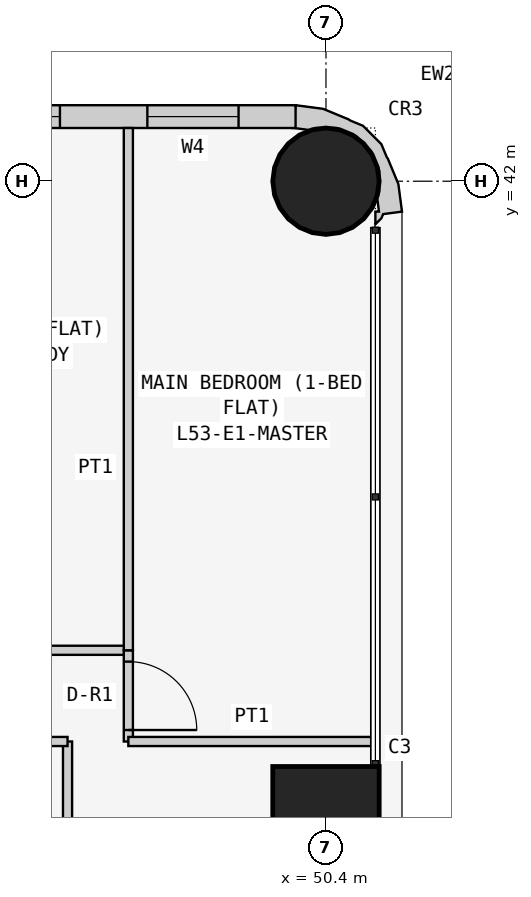
"""IFC4 building model, lengths in metres.
Left out: names, types, materials, properties, quantities, classifications, styles, units other than length and angle.
Written with IfcOpenShell. Run it as: python <this file> out.ifc"""

import sys

from ifc_helpers import new_model, si_unit, direction, frame, frame_2d, origin, origin_2d, place, context, subcontext, project, spatial, polyline, rectangle, circle, outline, extrude, element, fill, save


model = new_model("IFC4")
c1 = context("Model", 3, precision=1e-05, world=origin(), true_north=direction((0.0, 1.0)))
c2 = subcontext(c1, "Body", "Model", "MODEL_VIEW")
j1 = project(units=[si_unit("LENGTHUNIT", "METRE"), si_unit("PLANEANGLEUNIT", "RADIAN")], contexts=[c1])
p1 = place(None, origin())
s1 = spatial("IfcSite", under=j1, at=p1, CompositionType="ELEMENT")
p2 = place(p1, origin())
s2 = spatial("IfcBuilding", under=s1, at=p2, CompositionType="ELEMENT")
p3 = place(p2, frame((0.0, 0.0, 204.9)))
s3 = spatial("IfcBuildingStorey", under=s2, at=p3, CompositionType="ELEMENT", Elevation=204.9)
p4 = place(p3, frame((50.4, 33.6, 0.0), z_axis=(0.0, 0.0, 1.0), x_axis=(1.0, 0.0, 0.0)))
e1 = element("IfcColumn", 1, at=p4, inside=s3, PredefinedType="COLUMN", context=c2, shape_type="SweptSolid", body=[
    extrude(rectangle(XDim=1.4, YDim=1.4, at=origin_2d()), origin(), (0.0, 0.0, 1.0), 3.6),
])
p5 = place(p3, frame((50.4, 42.0, 0.0), z_axis=(0.0, 0.0, 1.0), x_axis=(1.0, 0.0, 0.0)))
e2 = element("IfcColumn", 2, at=p5, inside=s3, PredefinedType="COLUMN", context=c2, shape_type="SweptSolid", body=[
    extrude(circle(Radius=0.7, at=origin_2d()), origin(), (0.0, 0.0, 1.0), 3.6),
])
p6 = place(p3, frame((50.0, 42.85, 0.0), z_axis=(0.0, 0.0, 1.0), x_axis=(-1.0, 0.0, 0.0)))
e3 = element("IfcWall", 3, at=p6, inside=s3, PredefinedType="SOLIDWALL", context=c2, shape_type="SweptSolid", body=[
    extrude(rectangle(XDim=7.3, YDim=0.3, at=frame_2d((3.65, 0.0))), origin(), (0.0, 0.0, 1.0), 3.45),
])
p7 = place(p6, frame((3.1, 0.0, 0.9)))
e4 = element("IfcOpeningElement", 4, at=p7, cuts=e3, PredefinedType="OPENING", context=c2, shape_type="SweptSolid", body=[
    extrude(rectangle(XDim=2.4, YDim=1.5, at=frame_2d((1.2, 0.75))), frame((0.0, 0.16, 0.0), z_axis=(0.0, -1.0, 0.0), x_axis=(1.0, 0.0, 0.0)), (0.0, 0.0, 1.0), 0.32),
])
p8 = place(p6, frame((0.75, 0.0, 0.9)))
e5 = element("IfcOpeningElement", 5, at=p8, cuts=e3, PredefinedType="OPENING", context=c2, shape_type="SweptSolid", body=[
    extrude(rectangle(XDim=1.2, YDim=1.5, at=frame_2d((0.6, 0.75))), frame((0.0, 0.16, 0.0), z_axis=(0.0, -1.0, 0.0), x_axis=(1.0, 0.0, 0.0)), (0.0, 0.0, 1.0), 0.32),
])
p9 = place(p3, frame((50.988, 41.488, 0.0), z_axis=(0.0, 0.0, 1.0), x_axis=(0.898030234854, 0.439933741929, 0.0)))
e6 = element("IfcWall", 6, at=p9, inside=s3, PredefinedType="SOLIDWALL", context=c2, shape_type="SweptSolid", body=[
    extrude(outline(polyline([(0.138, -0.04), (0.182, -0.0), (0.419, -0.08), (0.536, 0.266), (0.559, 0.631), (0.555, 0.651), (0.566, 0.836), (0.455, 1.159), (0.333, 1.298), (0.324, 1.317), (0.082, 1.591), (-0.222, 1.793), (-0.39, 1.541), (-0.372, 1.532), (-0.195, 1.414), (-0.12, 1.41), (0.131, 1.287), (0.315, 1.078), (0.406, 0.814), (0.388, 0.536), (0.265, 0.285), (0.209, 0.235), (0.148, 0.053), (0.105, 0.074), (0.032, -0.076), (0.138, -0.04)])), origin(), (0.0, 0.0, 1.0), 3.45),
])
p10 = place(p3, frame((47.0, 29.4, 0.0), z_axis=(0.0, 0.0, 1.0), x_axis=(0.0, 1.0, 0.0)))
e7 = element("IfcWall", 7, at=p10, inside=s3, PredefinedType="PARTITIONING", context=c2, shape_type="SweptSolid", body=[
    extrude(rectangle(XDim=5.229, YDim=0.12, at=frame_2d((2.615, 0.0))), origin(), (0.0, 0.0, 1.0), 3.45),
])
p11 = place(p3, frame((47.0, 34.629, 0.0), z_axis=(0.0, 0.0, 1.0), x_axis=(-1.0, 0.0, 0.0)))
e8 = element("IfcWall", 8, at=p11, inside=s3, PredefinedType="PARTITIONING", context=c2, shape_type="SweptSolid", body=[
    extrude(rectangle(XDim=2.0, YDim=0.12, at=frame_2d((1.0, 0.0))), origin(), (0.0, 0.0, 1.0), 3.45),
])
p12 = place(p11, frame((0.55, 0.0, 0.0)))
e9 = element("IfcOpeningElement", 9, at=p12, cuts=e8, PredefinedType="OPENING", context=c2, shape_type="SweptSolid", body=[
    extrude(rectangle(XDim=0.9, YDim=2.1, at=frame_2d((0.45, 1.05))), frame((0.0, 0.07, 0.0), z_axis=(0.0, -1.0, 0.0), x_axis=(1.0, 0.0, 0.0)), (0.0, 0.0, 1.0), 0.14),
])
p13 = place(p3, frame((44.4, 35.829, 0.0), z_axis=(0.0, 0.0, 1.0), x_axis=(1.0, 0.0, 0.0)))
e10 = element("IfcWall", 10, at=p13, inside=s3, PredefinedType="PARTITIONING", context=c2, shape_type="SweptSolid", body=[
    extrude(rectangle(XDim=3.4, YDim=0.12, at=frame_2d((1.7, 0.0))), origin(), (0.0, 0.0, 1.0), 3.45),
])
p14 = place(p13, frame((1.25, 0.0, 0.0)))
e11 = element("IfcOpeningElement", 11, at=p14, cuts=e10, PredefinedType="OPENING", context=c2, shape_type="SweptSolid", body=[
    extrude(rectangle(XDim=0.9, YDim=2.1, at=frame_2d((0.45, 1.05))), frame((0.0, 0.07, 0.0), z_axis=(0.0, -1.0, 0.0), x_axis=(1.0, 0.0, 0.0)), (0.0, 0.0, 1.0), 0.14),
])
p15 = place(p3, frame((47.8, 35.829, 0.0), z_axis=(0.0, 0.0, 1.0), x_axis=(0.0, -1.0, 0.0)))
e12 = element("IfcWall", 12, at=p15, inside=s3, PredefinedType="PARTITIONING", context=c2, shape_type="SweptSolid", body=[
    extrude(rectangle(XDim=1.2, YDim=0.12, at=frame_2d((0.6, 0.0))), origin(), (0.0, 0.0, 1.0), 3.45),
])
p16 = place(p15, frame((0.149, 0.0, 0.0)))
e13 = element("IfcOpeningElement", 13, at=p16, cuts=e12, PredefinedType="OPENING", context=c2, shape_type="SweptSolid", body=[
    extrude(rectangle(XDim=0.9, YDim=2.1, at=frame_2d((0.45, 1.05))), frame((0.0, 0.07, 0.0), z_axis=(0.0, -1.0, 0.0), x_axis=(1.0, 0.0, 0.0)), (0.0, 0.0, 1.0), 0.14),
])
p17 = place(p3, frame((47.8, 34.629, 0.0), z_axis=(0.0, 0.0, 1.0), x_axis=(1.0, 0.0, 0.0)))
e14 = element("IfcWall", 14, at=p17, inside=s3, PredefinedType="PARTITIONING", context=c2, shape_type="SweptSolid", body=[
    extrude(rectangle(XDim=3.25, YDim=0.12, at=frame_2d((1.625, 0.0))), origin(), (0.0, 0.0, 1.0), 3.45),
])
p18 = place(p3, frame((47.8, 35.829, 0.0), z_axis=(0.0, 0.0, 1.0), x_axis=(0.0, 1.0, 0.0)))
e15 = element("IfcWall", 15, at=p18, inside=s3, PredefinedType="PARTITIONING", context=c2, shape_type="SweptSolid", body=[
    extrude(rectangle(XDim=6.871, YDim=0.12, at=frame_2d((3.436, 0.0))), origin(), (0.0, 0.0, 1.0), 3.45),
])
p19 = place(p7, origin())
e16 = element("IfcWindow", 16, at=p19, inside=s3, PartitioningType="SINGLE_PANEL", PredefinedType="WINDOW", context=c2, shape_type="SweptSolid", body=[
    extrude(rectangle(XDim=2.4, YDim=1.5, at=frame_2d((1.2, 0.75))), frame((0.0, 0.03, 0.0), z_axis=(0.0, -1.0, 0.0), x_axis=(1.0, 0.0, 0.0)), (0.0, 0.0, 1.0), 0.06),
])
fill(e4, e16)
p20 = place(p8, origin())
e17 = element("IfcWindow", 17, at=p20, inside=s3, PartitioningType="SINGLE_PANEL", PredefinedType="WINDOW", context=c2, shape_type="SweptSolid", body=[
    extrude(rectangle(XDim=1.2, YDim=1.5, at=frame_2d((0.6, 0.75))), frame((0.0, 0.03, 0.0), z_axis=(0.0, -1.0, 0.0), x_axis=(1.0, 0.0, 0.0)), (0.0, 0.0, 1.0), 0.06),
])
fill(e5, e17)
p21 = place(p16, origin())
e18 = element("IfcDoor", 18, at=p21, inside=s3, OperationType="SINGLE_SWING_RIGHT", PredefinedType="DOOR", context=c2, shape_type="SweptSolid", body=[
    extrude(rectangle(XDim=0.9, YDim=2.1, at=frame_2d((0.45, 1.05))), frame((0.0, 0.025, 0.0), z_axis=(0.0, -1.0, 0.0), x_axis=(1.0, 0.0, 0.0)), (0.0, 0.0, 1.0), 0.05),
])
fill(e13, e18)
save(model, sys.argv[1])
